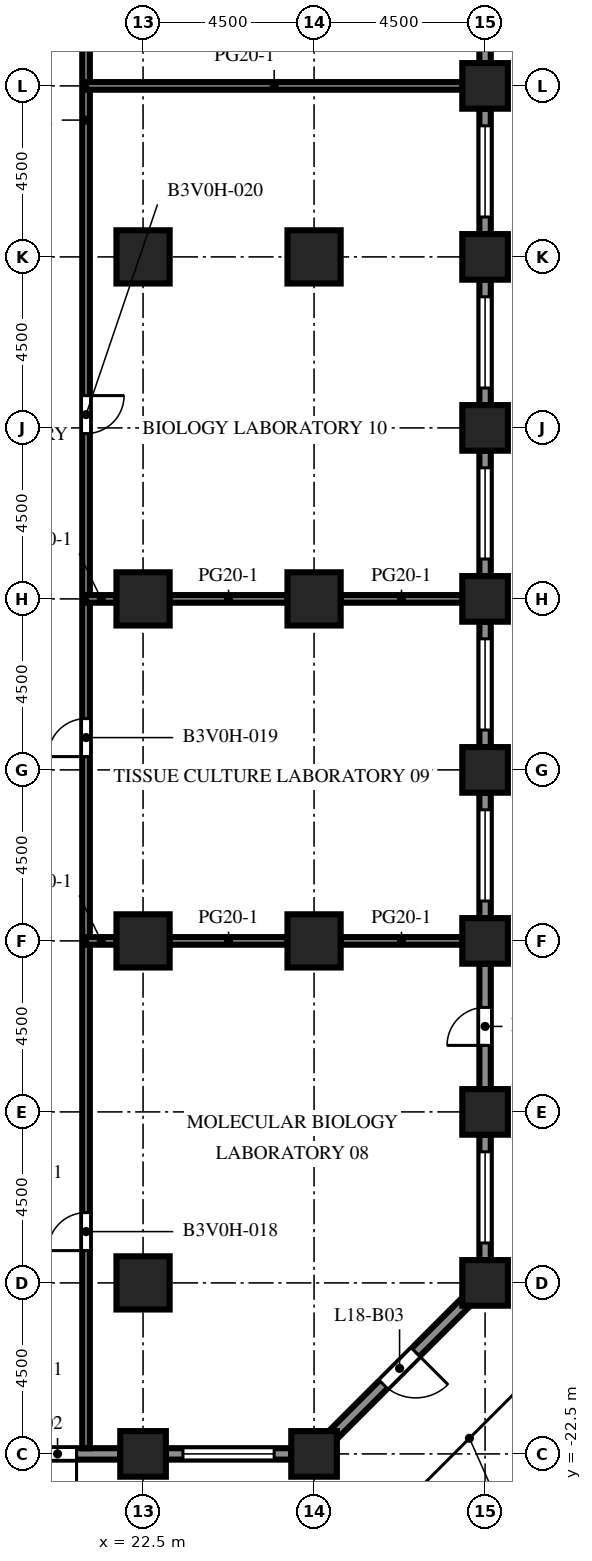
"""IFC4 building model, lengths in metres.
Left out: names, types, materials, properties, quantities, classifications, styles, units other than length and angle.
Written with IfcOpenShell. Run it as: python <this file> out.ifc"""

import sys

from ifc_helpers import new_model, si_unit, direction, frame, frame_2d, origin, origin_2d, place, context, subcontext, project, spatial, rectangle, extrude, element, fill, save


model = new_model("IFC4")
c1 = context("Model", 3, precision=1e-05, world=origin(), true_north=direction((0.0, 1.0)))
c2 = subcontext(c1, "Body", "Model", "MODEL_VIEW")
j1 = project(units=[si_unit("LENGTHUNIT", "METRE"), si_unit("PLANEANGLEUNIT", "RADIAN")], contexts=[c1])
p1 = place(None, origin())
s1 = spatial("IfcSite", under=j1, at=p1, CompositionType="ELEMENT")
p2 = place(p1, origin())
s2 = spatial("IfcBuilding", under=s1, at=p2, CompositionType="ELEMENT")
p3 = place(p2, frame((0.0, 0.0, 82.0)))
s3 = spatial("IfcBuildingStorey", under=s2, at=p3, CompositionType="ELEMENT", Elevation=82.0)
for number, where, z_axis, x_axis in (
    (1, (22.5, -22.5, 0.0), (0.0, 0.0, 1.0), (1.0, 0.0, 0.0)),
    (2, (27.0, -22.5, 0.0), (0.0, 0.0, 1.0), (1.0, 0.0, 0.0)),
    (3, (31.5, -18.0, 0.0), (0.0, 0.0, 1.0), (1.0, 0.0, 0.0)),
    (4, (31.5, -13.5, 0.0), (0.0, 0.0, 1.0), (1.0, 0.0, 0.0)),
    (5, (31.5, -9.0, 0.0), (0.0, 0.0, 1.0), (1.0, 0.0, 0.0)),
    (6, (31.5, -4.5, 0.0), (0.0, 0.0, 1.0), (1.0, 0.0, 0.0)),
    (7, (31.5, 0.0, 0.0), (0.0, 0.0, 1.0), (1.0, 0.0, 0.0)),
    (8, (31.5, 4.5, 0.0), (0.0, 0.0, 1.0), (1.0, 0.0, 0.0)),
    (9, (31.5, 9.0, 0.0), (0.0, 0.0, 1.0), (1.0, 0.0, 0.0)),
    (10, (31.5, 13.5, 0.0), (0.0, 0.0, 1.0), (1.0, 0.0, 0.0)),
):
    element("IfcColumn", number, at=place(p3, frame(where, z_axis=z_axis, x_axis=x_axis)), inside=s3, PredefinedType="COLUMN", context=c2, shape_type="SweptSolid", body=[
        extrude(rectangle(XDim=1.2, YDim=1.2, at=origin_2d()), origin(), (0.0, 0.0, 1.0), 4.1),
    ])
for number, where, z_axis, x_axis in (
    (11, (22.5, -18.0, 0.0), (0.0, 0.0, 1.0), (1.0, 0.0, 0.0)),
    (12, (22.5, -9.0, 0.0), (0.0, 0.0, 1.0), (1.0, 0.0, 0.0)),
    (13, (22.5, 0.0, 0.0), (0.0, 0.0, 1.0), (1.0, 0.0, 0.0)),
    (14, (22.5, 9.0, 0.0), (0.0, 0.0, 1.0), (1.0, 0.0, 0.0)),
    (15, (27.0, -9.0, 0.0), (0.0, 0.0, 1.0), (1.0, 0.0, 0.0)),
    (16, (27.0, 0.0, 0.0), (0.0, 0.0, 1.0), (1.0, 0.0, 0.0)),
    (17, (27.0, 9.0, 0.0), (0.0, 0.0, 1.0), (1.0, 0.0, 0.0)),
):
    element("IfcColumn", number, at=place(p3, frame(where, z_axis=z_axis, x_axis=x_axis)), inside=s3, PredefinedType="COLUMN", context=c2, shape_type="SweptSolid", body=[
        extrude(rectangle(XDim=1.4, YDim=1.4, at=origin_2d()), origin(), (0.0, 0.0, 1.0), 4.1),
    ])
p4 = place(p3, frame((21.9, -22.5, 0.0), z_axis=(0.0, 0.0, 1.0), x_axis=(-1.0, 0.0, 0.0)))
e18 = element("IfcWall", 18, at=p4, inside=s3, PredefinedType="SOLIDWALL", context=c2, shape_type="SweptSolid", body=[
    extrude(rectangle(XDim=3.3, YDim=0.3, at=frame_2d((1.65, 0.0))), origin(), (0.0, 0.0, 1.0), 2.75),
])
p5 = place(p4, frame((1.15, 0.0, 0.0)))
e19 = element("IfcOpeningElement", 19, at=p5, cuts=e18, PredefinedType="OPENING", context=c2, shape_type="SweptSolid", body=[
    extrude(rectangle(XDim=1.0, YDim=2.2, at=frame_2d((0.5, 1.1))), frame((0.0, 0.16, 0.0), z_axis=(0.0, -1.0, 0.0), x_axis=(1.0, 0.0, 0.0)), (0.0, 0.0, 1.0), 0.32),
])
p6 = place(p3, frame((26.4, -22.5, 0.0), z_axis=(0.0, 0.0, 1.0), x_axis=(-1.0, 0.0, 0.0)))
e20 = element("IfcWall", 20, at=p6, inside=s3, PredefinedType="SOLIDWALL", context=c2, shape_type="SweptSolid", body=[
    extrude(rectangle(XDim=3.3, YDim=0.3, at=frame_2d((1.65, 0.0))), origin(), (0.0, 0.0, 1.0), 2.75),
])
p7 = place(p6, frame((0.45, 0.0, 0.8)))
e21 = element("IfcOpeningElement", 21, at=p7, cuts=e20, PredefinedType="OPENING", context=c2, shape_type="SweptSolid", body=[
    extrude(rectangle(XDim=2.4, YDim=1.7, at=frame_2d((1.2, 0.85))), frame((0.0, 0.16, 0.0), z_axis=(0.0, -1.0, 0.0), x_axis=(1.0, 0.0, 0.0)), (0.0, 0.0, 1.0), 0.32),
])
p8 = place(p3, frame((31.006, -18.494, 0.0), z_axis=(0.0, 0.0, 1.0), x_axis=(-0.707106781187, -0.707106781187, 0.0)))
e22 = element("IfcWall", 22, at=p8, inside=s3, PredefinedType="SOLIDWALL", context=c2, shape_type="SweptSolid", body=[
    extrude(rectangle(XDim=4.967, YDim=0.3, at=frame_2d((2.483, 0.0))), origin(), (0.0, 0.0, 1.0), 2.75),
])
p9 = place(p8, frame((1.884, 0.0, 0.0)))
e23 = element("IfcOpeningElement", 23, at=p9, cuts=e22, PredefinedType="OPENING", context=c2, shape_type="SweptSolid", body=[
    extrude(rectangle(XDim=1.2, YDim=2.2, at=frame_2d((0.6, 1.1))), frame((0.0, 0.16, 0.0), z_axis=(0.0, -1.0, 0.0), x_axis=(1.0, 0.0, 0.0)), (0.0, 0.0, 1.0), 0.32),
])
p10 = place(p3, frame((31.5, -14.1, 0.0), z_axis=(0.0, 0.0, 1.0), x_axis=(0.0, -1.0, 0.0)))
e24 = element("IfcWall", 24, at=p10, inside=s3, PredefinedType="SOLIDWALL", context=c2, shape_type="SweptSolid", body=[
    extrude(rectangle(XDim=3.3, YDim=0.3, at=frame_2d((1.65, 0.0))), origin(), (0.0, 0.0, 1.0), 2.75),
])
p11 = place(p10, frame((0.45, 0.0, 0.8)))
e25 = element("IfcOpeningElement", 25, at=p11, cuts=e24, PredefinedType="OPENING", context=c2, shape_type="SweptSolid", body=[
    extrude(rectangle(XDim=2.4, YDim=1.7, at=frame_2d((1.2, 0.85))), frame((0.0, 0.16, 0.0), z_axis=(0.0, -1.0, 0.0), x_axis=(1.0, 0.0, 0.0)), (0.0, 0.0, 1.0), 0.32),
])
p12 = place(p3, frame((31.5, -9.6, 0.0), z_axis=(0.0, 0.0, 1.0), x_axis=(0.0, -1.0, 0.0)))
e26 = element("IfcWall", 26, at=p12, inside=s3, PredefinedType="SOLIDWALL", context=c2, shape_type="SweptSolid", body=[
    extrude(rectangle(XDim=3.3, YDim=0.3, at=frame_2d((1.65, 0.0))), origin(), (0.0, 0.0, 1.0), 2.75),
])
p13 = place(p12, frame((1.15, 0.0, 0.0)))
e27 = element("IfcOpeningElement", 27, at=p13, cuts=e26, PredefinedType="OPENING", context=c2, shape_type="SweptSolid", body=[
    extrude(rectangle(XDim=1.0, YDim=2.2, at=frame_2d((0.5, 1.1))), frame((0.0, 0.16, 0.0), z_axis=(0.0, -1.0, 0.0), x_axis=(1.0, 0.0, 0.0)), (0.0, 0.0, 1.0), 0.32),
])
p14 = place(p3, frame((31.5, -5.1, 0.0), z_axis=(0.0, 0.0, 1.0), x_axis=(0.0, -1.0, 0.0)))
e28 = element("IfcWall", 28, at=p14, inside=s3, PredefinedType="SOLIDWALL", context=c2, shape_type="SweptSolid", body=[
    extrude(rectangle(XDim=3.3, YDim=0.3, at=frame_2d((1.65, 0.0))), origin(), (0.0, 0.0, 1.0), 2.75),
])
p15 = place(p14, frame((0.45, 0.0, 0.8)))
e29 = element("IfcOpeningElement", 29, at=p15, cuts=e28, PredefinedType="OPENING", context=c2, shape_type="SweptSolid", body=[
    extrude(rectangle(XDim=2.4, YDim=1.7, at=frame_2d((1.2, 0.85))), frame((0.0, 0.16, 0.0), z_axis=(0.0, -1.0, 0.0), x_axis=(1.0, 0.0, 0.0)), (0.0, 0.0, 1.0), 0.32),
])
p16 = place(p3, frame((31.5, -0.6, 0.0), z_axis=(0.0, 0.0, 1.0), x_axis=(0.0, -1.0, 0.0)))
e30 = element("IfcWall", 30, at=p16, inside=s3, PredefinedType="SOLIDWALL", context=c2, shape_type="SweptSolid", body=[
    extrude(rectangle(XDim=3.3, YDim=0.3, at=frame_2d((1.65, 0.0))), origin(), (0.0, 0.0, 1.0), 2.75),
])
p17 = place(p16, frame((0.45, 0.0, 0.8)))
e31 = element("IfcOpeningElement", 31, at=p17, cuts=e30, PredefinedType="OPENING", context=c2, shape_type="SweptSolid", body=[
    extrude(rectangle(XDim=2.4, YDim=1.7, at=frame_2d((1.2, 0.85))), frame((0.0, 0.16, 0.0), z_axis=(0.0, -1.0, 0.0), x_axis=(1.0, 0.0, 0.0)), (0.0, 0.0, 1.0), 0.32),
])
p18 = place(p3, frame((31.5, 3.9, 0.0), z_axis=(0.0, 0.0, 1.0), x_axis=(0.0, -1.0, 0.0)))
e32 = element("IfcWall", 32, at=p18, inside=s3, PredefinedType="SOLIDWALL", context=c2, shape_type="SweptSolid", body=[
    extrude(rectangle(XDim=3.3, YDim=0.3, at=frame_2d((1.65, 0.0))), origin(), (0.0, 0.0, 1.0), 2.75),
])
p19 = place(p18, frame((0.45, 0.0, 0.8)))
e33 = element("IfcOpeningElement", 33, at=p19, cuts=e32, PredefinedType="OPENING", context=c2, shape_type="SweptSolid", body=[
    extrude(rectangle(XDim=2.4, YDim=1.7, at=frame_2d((1.2, 0.85))), frame((0.0, 0.16, 0.0), z_axis=(0.0, -1.0, 0.0), x_axis=(1.0, 0.0, 0.0)), (0.0, 0.0, 1.0), 0.32),
])
p20 = place(p3, frame((31.5, 8.4, 0.0), z_axis=(0.0, 0.0, 1.0), x_axis=(0.0, -1.0, 0.0)))
e34 = element("IfcWall", 34, at=p20, inside=s3, PredefinedType="SOLIDWALL", context=c2, shape_type="SweptSolid", body=[
    extrude(rectangle(XDim=3.3, YDim=0.3, at=frame_2d((1.65, 0.0))), origin(), (0.0, 0.0, 1.0), 2.75),
])
p21 = place(p20, frame((0.45, 0.0, 0.8)))
e35 = element("IfcOpeningElement", 35, at=p21, cuts=e34, PredefinedType="OPENING", context=c2, shape_type="SweptSolid", body=[
    extrude(rectangle(XDim=2.4, YDim=1.7, at=frame_2d((1.2, 0.85))), frame((0.0, 0.16, 0.0), z_axis=(0.0, -1.0, 0.0), x_axis=(1.0, 0.0, 0.0)), (0.0, 0.0, 1.0), 0.32),
])
p22 = place(p3, frame((31.5, 12.9, 0.0), z_axis=(0.0, 0.0, 1.0), x_axis=(0.0, -1.0, 0.0)))
e36 = element("IfcWall", 36, at=p22, inside=s3, PredefinedType="SOLIDWALL", context=c2, shape_type="SweptSolid", body=[
    extrude(rectangle(XDim=3.3, YDim=0.3, at=frame_2d((1.65, 0.0))), origin(), (0.0, 0.0, 1.0), 2.75),
])
p23 = place(p22, frame((0.45, 0.0, 0.8)))
e37 = element("IfcOpeningElement", 37, at=p23, cuts=e36, PredefinedType="OPENING", context=c2, shape_type="SweptSolid", body=[
    extrude(rectangle(XDim=2.4, YDim=1.7, at=frame_2d((1.2, 0.85))), frame((0.0, 0.16, 0.0), z_axis=(0.0, -1.0, 0.0), x_axis=(1.0, 0.0, 0.0)), (0.0, 0.0, 1.0), 0.32),
])
p24 = place(p3, frame((31.5, 17.4, 0.0), z_axis=(0.0, 0.0, 1.0), x_axis=(0.0, -1.0, 0.0)))
e38 = element("IfcWall", 38, at=p24, inside=s3, PredefinedType="SOLIDWALL", context=c2, shape_type="SweptSolid", body=[
    extrude(rectangle(XDim=3.3, YDim=0.3, at=frame_2d((1.65, 0.0))), origin(), (0.0, 0.0, 1.0), 2.75),
])
p25 = place(p24, frame((0.45, 0.0, 0.8)))
e39 = element("IfcOpeningElement", 39, at=p25, cuts=e38, PredefinedType="OPENING", context=c2, shape_type="SweptSolid", body=[
    extrude(rectangle(XDim=2.4, YDim=1.7, at=frame_2d((1.2, 0.85))), frame((0.0, 0.16, 0.0), z_axis=(0.0, -1.0, 0.0), x_axis=(1.0, 0.0, 0.0)), (0.0, 0.0, 1.0), 0.32),
])
p26 = place(p3, frame((21.0, 31.35, 0.0), z_axis=(0.0, 0.0, 1.0), x_axis=(0.0, -1.0, 0.0)))
e40 = element("IfcWall", 40, at=p26, inside=s3, PredefinedType="PARTITIONING", context=c2, shape_type="SweptSolid", body=[
    extrude(rectangle(XDim=53.7, YDim=0.2, at=frame_2d((26.85, 0.0))), origin(), (0.0, 0.0, 1.0), 3.65),
])
p27 = place(p26, frame((47.5, 0.0, 0.0)))
e41 = element("IfcOpeningElement", 41, at=p27, cuts=e40, PredefinedType="OPENING", context=c2, shape_type="SweptSolid", body=[
    extrude(rectangle(XDim=1.0, YDim=2.1, at=frame_2d((0.5, 1.05))), frame((0.0, 0.11, 0.0), z_axis=(0.0, -1.0, 0.0), x_axis=(1.0, 0.0, 0.0)), (0.0, 0.0, 1.0), 0.22),
])
p28 = place(p26, frame((34.5, 0.0, 0.0)))
e42 = element("IfcOpeningElement", 42, at=p28, cuts=e40, PredefinedType="OPENING", context=c2, shape_type="SweptSolid", body=[
    extrude(rectangle(XDim=1.0, YDim=2.1, at=frame_2d((0.5, 1.05))), frame((0.0, 0.11, 0.0), z_axis=(0.0, -1.0, 0.0), x_axis=(1.0, 0.0, 0.0)), (0.0, 0.0, 1.0), 0.22),
])
p29 = place(p26, frame((26.0, 0.0, 0.0)))
e43 = element("IfcOpeningElement", 43, at=p29, cuts=e40, PredefinedType="OPENING", context=c2, shape_type="SweptSolid", body=[
    extrude(rectangle(XDim=1.0, YDim=2.1, at=frame_2d((0.5, 1.05))), frame((0.0, 0.11, 0.0), z_axis=(0.0, -1.0, 0.0), x_axis=(1.0, 0.0, 0.0)), (0.0, 0.0, 1.0), 0.22),
])
p30 = place(p26, frame((10.5, 0.0, 0.0)))
e44 = element("IfcOpeningElement", 44, at=p30, cuts=e40, PredefinedType="OPENING", context=c2, shape_type="SweptSolid", body=[
    extrude(rectangle(XDim=1.0, YDim=2.1, at=frame_2d((0.5, 1.05))), frame((0.0, 0.11, 0.0), z_axis=(0.0, -1.0, 0.0), x_axis=(1.0, 0.0, 0.0)), (0.0, 0.0, 1.0), 0.22),
])
p31 = place(p3, frame((21.0, -9.0, 0.0), z_axis=(0.0, 0.0, 1.0), x_axis=(1.0, 0.0, 0.0)))
e45 = element("IfcWall", 45, at=p31, inside=s3, PredefinedType="PARTITIONING", context=c2, shape_type="SweptSolid", body=[
    extrude(rectangle(XDim=0.8, YDim=0.2, at=frame_2d((0.4, 0.0))), origin(), (0.0, 0.0, 1.0), 3.65),
])
p32 = place(p3, frame((23.2, -9.0, 0.0), z_axis=(0.0, 0.0, 1.0), x_axis=(1.0, 0.0, 0.0)))
e46 = element("IfcWall", 46, at=p32, inside=s3, PredefinedType="PARTITIONING", context=c2, shape_type="SweptSolid", body=[
    extrude(rectangle(XDim=3.1, YDim=0.2, at=frame_2d((1.55, 0.0))), origin(), (0.0, 0.0, 1.0), 3.65),
])
p33 = place(p3, frame((27.7, -9.0, 0.0), z_axis=(0.0, 0.0, 1.0), x_axis=(1.0, 0.0, 0.0)))
e47 = element("IfcWall", 47, at=p33, inside=s3, PredefinedType="PARTITIONING", context=c2, shape_type="SweptSolid", body=[
    extrude(rectangle(XDim=3.2, YDim=0.2, at=frame_2d((1.6, 0.0))), origin(), (0.0, 0.0, 1.0), 3.65),
])
p34 = place(p3, frame((21.0, 0.0, 0.0), z_axis=(0.0, 0.0, 1.0), x_axis=(1.0, 0.0, 0.0)))
e48 = element("IfcWall", 48, at=p34, inside=s3, PredefinedType="PARTITIONING", context=c2, shape_type="SweptSolid", body=[
    extrude(rectangle(XDim=0.8, YDim=0.2, at=frame_2d((0.4, 0.0))), origin(), (0.0, 0.0, 1.0), 3.65),
])
p35 = place(p3, frame((23.2, 0.0, 0.0), z_axis=(0.0, 0.0, 1.0), x_axis=(1.0, 0.0, 0.0)))
e49 = element("IfcWall", 49, at=p35, inside=s3, PredefinedType="PARTITIONING", context=c2, shape_type="SweptSolid", body=[
    extrude(rectangle(XDim=3.1, YDim=0.2, at=frame_2d((1.55, 0.0))), origin(), (0.0, 0.0, 1.0), 3.65),
])
p36 = place(p3, frame((27.7, 0.0, 0.0), z_axis=(0.0, 0.0, 1.0), x_axis=(1.0, 0.0, 0.0)))
e50 = element("IfcWall", 50, at=p36, inside=s3, PredefinedType="PARTITIONING", context=c2, shape_type="SweptSolid", body=[
    extrude(rectangle(XDim=3.2, YDim=0.2, at=frame_2d((1.6, 0.0))), origin(), (0.0, 0.0, 1.0), 3.65),
])
p37 = place(p3, frame((21.0, 13.5, 0.0), z_axis=(0.0, 0.0, 1.0), x_axis=(1.0, 0.0, 0.0)))
e51 = element("IfcWall", 51, at=p37, inside=s3, PredefinedType="PARTITIONING", context=c2, shape_type="SweptSolid", body=[
    extrude(rectangle(XDim=9.9, YDim=0.2, at=frame_2d((4.95, 0.0))), origin(), (0.0, 0.0, 1.0), 3.65),
])
p38 = place(p5, origin())
e52 = element("IfcDoor", 52, at=p38, inside=s3, OperationType="SINGLE_SWING_LEFT", PredefinedType="DOOR", context=c2, shape_type="SweptSolid", body=[
    extrude(rectangle(XDim=1.0, YDim=2.2, at=frame_2d((0.5, 1.1))), frame((0.0, 0.025, 0.0), z_axis=(0.0, -1.0, 0.0), x_axis=(1.0, 0.0, 0.0)), (0.0, 0.0, 1.0), 0.05),
])
fill(e19, e52)
p39 = place(p7, origin())
e53 = element("IfcWindow", 53, at=p39, inside=s3, PartitioningType="SINGLE_PANEL", PredefinedType="WINDOW", context=c2, shape_type="SweptSolid", body=[
    extrude(rectangle(XDim=2.4, YDim=1.7, at=frame_2d((1.2, 0.85))), frame((0.0, 0.03, 0.0), z_axis=(0.0, -1.0, 0.0), x_axis=(1.0, 0.0, 0.0)), (0.0, 0.0, 1.0), 0.06),
])
fill(e21, e53)
p40 = place(p9, origin())
e54 = element("IfcDoor", 54, at=p40, inside=s3, OperationType="SINGLE_SWING_LEFT", PredefinedType="DOOR", context=c2, shape_type="SweptSolid", body=[
    extrude(rectangle(XDim=1.2, YDim=2.2, at=frame_2d((0.6, 1.1))), frame((0.0, 0.025, 0.0), z_axis=(0.0, -1.0, 0.0), x_axis=(1.0, 0.0, 0.0)), (0.0, 0.0, 1.0), 0.05),
])
fill(e23, e54)
p41 = place(p11, origin())
e55 = element("IfcWindow", 55, at=p41, inside=s3, PartitioningType="SINGLE_PANEL", PredefinedType="WINDOW", context=c2, shape_type="SweptSolid", body=[
    extrude(rectangle(XDim=2.4, YDim=1.7, at=frame_2d((1.2, 0.85))), frame((0.0, 0.03, 0.0), z_axis=(0.0, -1.0, 0.0), x_axis=(1.0, 0.0, 0.0)), (0.0, 0.0, 1.0), 0.06),
])
fill(e25, e55)
p42 = place(p13, origin())
e56 = element("IfcDoor", 56, at=p42, inside=s3, OperationType="SINGLE_SWING_RIGHT", PredefinedType="DOOR", context=c2, shape_type="SweptSolid", body=[
    extrude(rectangle(XDim=1.0, YDim=2.2, at=frame_2d((0.5, 1.1))), frame((0.0, 0.025, 0.0), z_axis=(0.0, -1.0, 0.0), x_axis=(1.0, 0.0, 0.0)), (0.0, 0.0, 1.0), 0.05),
])
fill(e27, e56)
p43 = place(p15, origin())
e57 = element("IfcWindow", 57, at=p43, inside=s3, PartitioningType="SINGLE_PANEL", PredefinedType="WINDOW", context=c2, shape_type="SweptSolid", body=[
    extrude(rectangle(XDim=2.4, YDim=1.7, at=frame_2d((1.2, 0.85))), frame((0.0, 0.03, 0.0), z_axis=(0.0, -1.0, 0.0), x_axis=(1.0, 0.0, 0.0)), (0.0, 0.0, 1.0), 0.06),
])
fill(e29, e57)
p44 = place(p17, origin())
e58 = element("IfcWindow", 58, at=p44, inside=s3, PartitioningType="SINGLE_PANEL", PredefinedType="WINDOW", context=c2, shape_type="SweptSolid", body=[
    extrude(rectangle(XDim=2.4, YDim=1.7, at=frame_2d((1.2, 0.85))), frame((0.0, 0.03, 0.0), z_axis=(0.0, -1.0, 0.0), x_axis=(1.0, 0.0, 0.0)), (0.0, 0.0, 1.0), 0.06),
])
fill(e31, e58)
p45 = place(p19, origin())
e59 = element("IfcWindow", 59, at=p45, inside=s3, PartitioningType="SINGLE_PANEL", PredefinedType="WINDOW", context=c2, shape_type="SweptSolid", body=[
    extrude(rectangle(XDim=2.4, YDim=1.7, at=frame_2d((1.2, 0.85))), frame((0.0, 0.03, 0.0), z_axis=(0.0, -1.0, 0.0), x_axis=(1.0, 0.0, 0.0)), (0.0, 0.0, 1.0), 0.06),
])
fill(e33, e59)
p46 = place(p21, origin())
e60 = element("IfcWindow", 60, at=p46, inside=s3, PartitioningType="SINGLE_PANEL", PredefinedType="WINDOW", context=c2, shape_type="SweptSolid", body=[
    extrude(rectangle(XDim=2.4, YDim=1.7, at=frame_2d((1.2, 0.85))), frame((0.0, 0.03, 0.0), z_axis=(0.0, -1.0, 0.0), x_axis=(1.0, 0.0, 0.0)), (0.0, 0.0, 1.0), 0.06),
])
fill(e35, e60)
p47 = place(p23, origin())
e61 = element("IfcWindow", 61, at=p47, inside=s3, PartitioningType="SINGLE_PANEL", PredefinedType="WINDOW", context=c2, shape_type="SweptSolid", body=[
    extrude(rectangle(XDim=2.4, YDim=1.7, at=frame_2d((1.2, 0.85))), frame((0.0, 0.03, 0.0), z_axis=(0.0, -1.0, 0.0), x_axis=(1.0, 0.0, 0.0)), (0.0, 0.0, 1.0), 0.06),
])
fill(e37, e61)
p48 = place(p27, origin())
e62 = element("IfcDoor", 62, at=p48, inside=s3, OperationType="SINGLE_SWING_RIGHT", PredefinedType="DOOR", context=c2, shape_type="SweptSolid", body=[
    extrude(rectangle(XDim=1.0, YDim=2.1, at=frame_2d((0.5, 1.05))), frame((0.0, 0.025, 0.0), z_axis=(0.0, -1.0, 0.0), x_axis=(1.0, 0.0, 0.0)), (0.0, 0.0, 1.0), 0.05),
])
fill(e41, e62)
p49 = place(p28, origin())
e63 = element("IfcDoor", 63, at=p49, inside=s3, OperationType="SINGLE_SWING_RIGHT", PredefinedType="DOOR", context=c2, shape_type="SweptSolid", body=[
    extrude(rectangle(XDim=1.0, YDim=2.1, at=frame_2d((0.5, 1.05))), frame((0.0, 0.025, 0.0), z_axis=(0.0, -1.0, 0.0), x_axis=(1.0, 0.0, 0.0)), (0.0, 0.0, 1.0), 0.05),
])
fill(e42, e63)
p50 = place(p29, origin())
e64 = element("IfcDoor", 64, at=p50, inside=s3, OperationType="SINGLE_SWING_LEFT", PredefinedType="DOOR", context=c2, shape_type="SweptSolid", body=[
    extrude(rectangle(XDim=1.0, YDim=2.1, at=frame_2d((0.5, 1.05))), frame((0.0, 0.025, 0.0), z_axis=(0.0, -1.0, 0.0), x_axis=(1.0, 0.0, 0.0)), (0.0, 0.0, 1.0), 0.05),
])
fill(e43, e64)
save(model, sys.argv[1])
